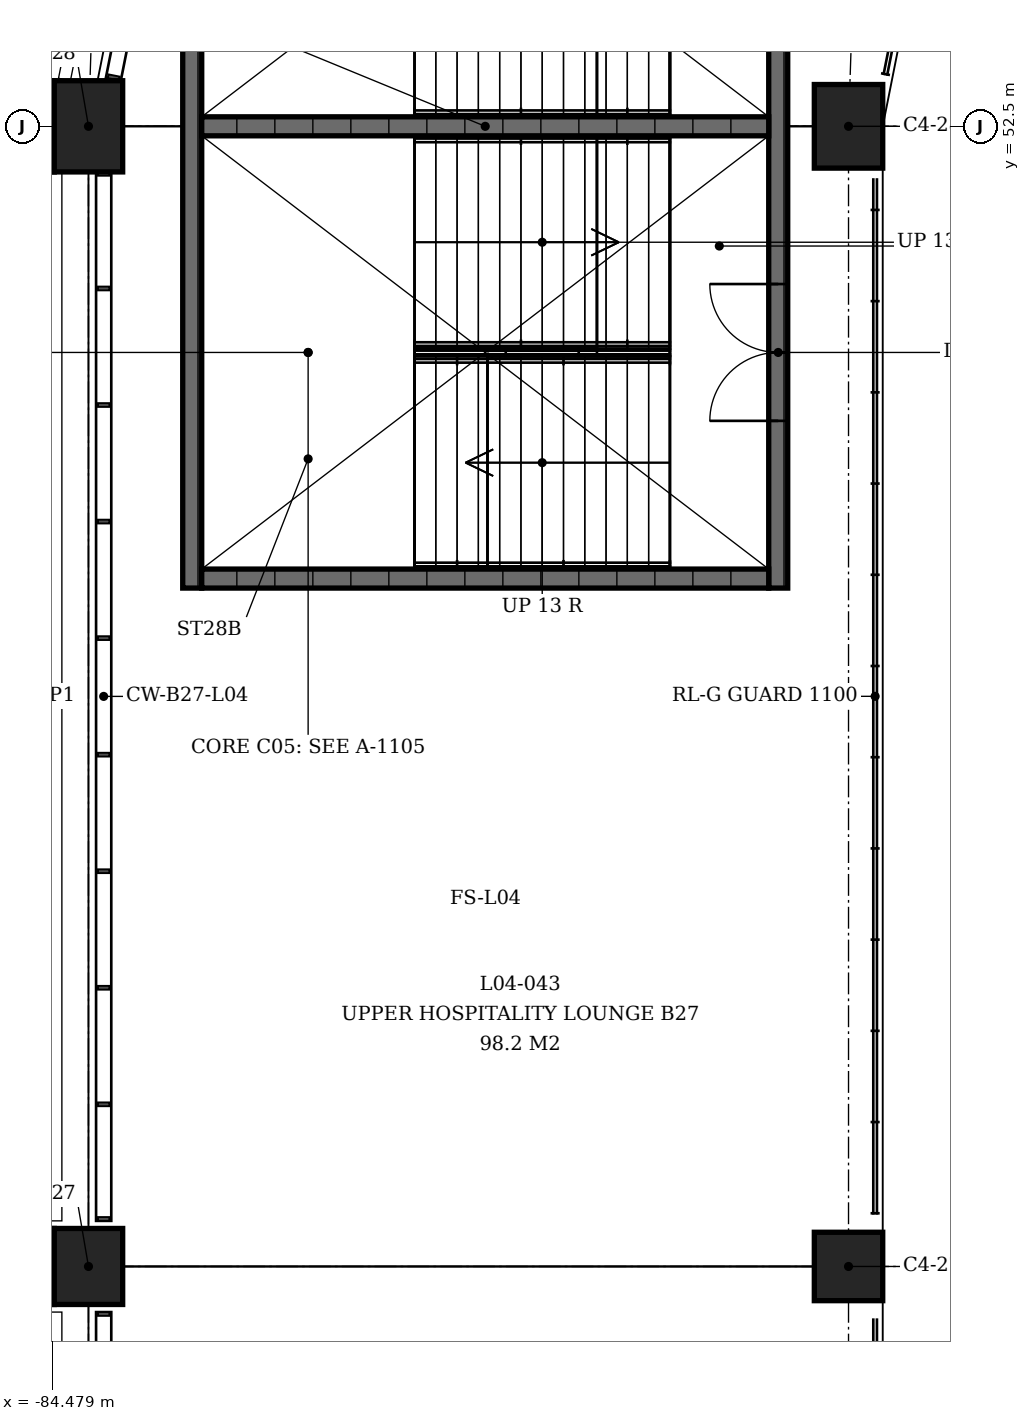
"""IFC4 building model, lengths in metres.
Left out: names, types, materials, properties, quantities, classifications, styles, units other than length and angle.
Written with IfcOpenShell. Run it as: python <this file> out.ifc"""

import sys

from ifc_helpers import new_model, si_unit, direction, frame, frame_2d, origin, origin_2d, place, context, subcontext, project, spatial, rectangle, extrude, element, fill, save


model = new_model("IFC4")
c1 = context("Model", 3, precision=1e-05, world=origin(), true_north=direction((0.0, 1.0)))
c2 = subcontext(c1, "Body", "Model", "MODEL_VIEW")
j1 = project(units=[si_unit("LENGTHUNIT", "METRE"), si_unit("PLANEANGLEUNIT", "RADIAN")], contexts=[c1])
p1 = place(None, origin())
s1 = spatial("IfcSite", under=j1, at=p1, CompositionType="ELEMENT")
p2 = place(p1, origin())
s2 = spatial("IfcBuilding", under=s1, at=p2, CompositionType="ELEMENT")
p3 = place(p2, frame((0.0, 0.0, 18.0)))
s3 = spatial("IfcBuildingStorey", under=s2, at=p3, CompositionType="ELEMENT", Elevation=18.0)
p4 = place(p3, frame((-74.0, 37.5, 0.0), z_axis=(0.0, 0.0, 1.0), x_axis=(0.0, -1.0, 0.0)))
e1 = element("IfcColumn", 1, at=p4, inside=s3, PredefinedType="COLUMN", context=c2, shape_type="SweptSolid", body=[
    extrude(rectangle(XDim=0.9, YDim=0.9, at=origin_2d()), origin(), (0.0, 0.0, 1.0), 4.5),
])
p5 = place(p3, frame((-84.0, 37.5, 0.0), z_axis=(0.0, 0.0, 1.0), x_axis=(0.0, -1.0, 0.0)))
e2 = element("IfcColumn", 2, at=p5, inside=s3, PredefinedType="COLUMN", context=c2, shape_type="SweptSolid", body=[
    extrude(rectangle(XDim=1.0, YDim=0.9, at=origin_2d()), origin(), (0.0, 0.0, 1.0), 4.5),
])
p6 = place(p3, frame((-74.0, 52.5, 0.0), z_axis=(0.0, 0.0, 1.0), x_axis=(0.0, -1.0, 0.0)))
e3 = element("IfcColumn", 3, at=p6, inside=s3, PredefinedType="COLUMN", context=c2, shape_type="SweptSolid", body=[
    extrude(rectangle(XDim=1.1, YDim=0.9, at=origin_2d()), origin(), (0.0, 0.0, 1.0), 4.5),
])
p7 = place(p3, frame((-84.0, 52.5, 0.0), z_axis=(0.0, 0.0, 1.0), x_axis=(0.0, -1.0, 0.0)))
e4 = element("IfcColumn", 4, at=p7, inside=s3, PredefinedType="COLUMN", context=c2, shape_type="SweptSolid", body=[
    extrude(rectangle(XDim=1.2, YDim=0.9, at=origin_2d()), origin(), (0.0, 0.0, 1.0), 4.5),
])
p8 = place(p3, frame((-74.925, 58.575, 0.0), z_axis=(0.0, 0.0, 1.0), x_axis=(0.0, -1.0, 0.0)))
e5 = element("IfcWall", 5, at=p8, inside=s3, PredefinedType="SHEAR", context=c2, shape_type="SweptSolid", body=[
    extrude(rectangle(XDim=12.15, YDim=0.25, at=frame_2d((6.075, 0.0))), origin(), (0.0, 0.0, 1.0), 4.09),
])
p9 = place(p8, frame((2.2, 0.0, 0.0)))
e6 = element("IfcOpeningElement", 6, at=p9, cuts=e5, PredefinedType="OPENING", context=c2, shape_type="SweptSolid", body=[
    extrude(rectangle(XDim=1.8, YDim=2.1, at=frame_2d((0.9, 1.05))), frame((0.0, 0.125, 0.0), z_axis=(0.0, -1.0, 0.0), x_axis=(1.0, 0.0, 0.0)), (0.0, 0.0, 1.0), 0.25),
])
p10 = place(p8, frame((8.15, 0.0, 0.0)))
e7 = element("IfcOpeningElement", 7, at=p10, cuts=e5, PredefinedType="OPENING", context=c2, shape_type="SweptSolid", body=[
    extrude(rectangle(XDim=1.8, YDim=2.1, at=frame_2d((0.9, 1.05))), frame((0.0, 0.125, 0.0), z_axis=(0.0, -1.0, 0.0), x_axis=(1.0, 0.0, 0.0)), (0.0, 0.0, 1.0), 0.25),
])
p11 = place(p3, frame((-82.635, 58.575, 0.0), z_axis=(0.0, 0.0, 1.0), x_axis=(0.0, -1.0, 0.0)))
e8 = element("IfcWall", 8, at=p11, inside=s3, PredefinedType="SHEAR", context=c2, shape_type="SweptSolid", body=[
    extrude(rectangle(XDim=12.15, YDim=0.25, at=frame_2d((6.075, 0.0))), origin(), (0.0, 0.0, 1.0), 4.09),
])
for number, where, z_axis, x_axis in (
    (9, (-75.05, 46.55, 0.0), (0.0, 0.0, 1.0), (-1.0, 0.0, 0.0)),
    (10, (-75.05, 52.5, 0.0), (0.0, 0.0, 1.0), (-1.0, 0.0, 0.0)),
):
    element("IfcWall", number, at=place(p3, frame(where, z_axis=z_axis, x_axis=x_axis)), inside=s3, PredefinedType="SHEAR", context=c2, shape_type="SweptSolid", body=[
        extrude(rectangle(XDim=7.46, YDim=0.25, at=frame_2d((3.73, 0.0))), origin(), (0.0, 0.0, 1.0), 4.09),
    ])
p12 = place(p10, origin())
e11 = element("IfcDoor", 11, at=p12, inside=s3, OperationType="DOUBLE_DOOR_SINGLE_SWING", PredefinedType="DOOR", context=c2, shape_type="SweptSolid", body=[
    extrude(rectangle(XDim=1.8, YDim=2.1, at=frame_2d((0.9, 1.05))), frame((0.0, 0.025, 0.0), z_axis=(0.0, -1.0, 0.0), x_axis=(1.0, 0.0, 0.0)), (0.0, 0.0, 1.0), 0.05),
])
fill(e7, e11)
save(model, sys.argv[1])
